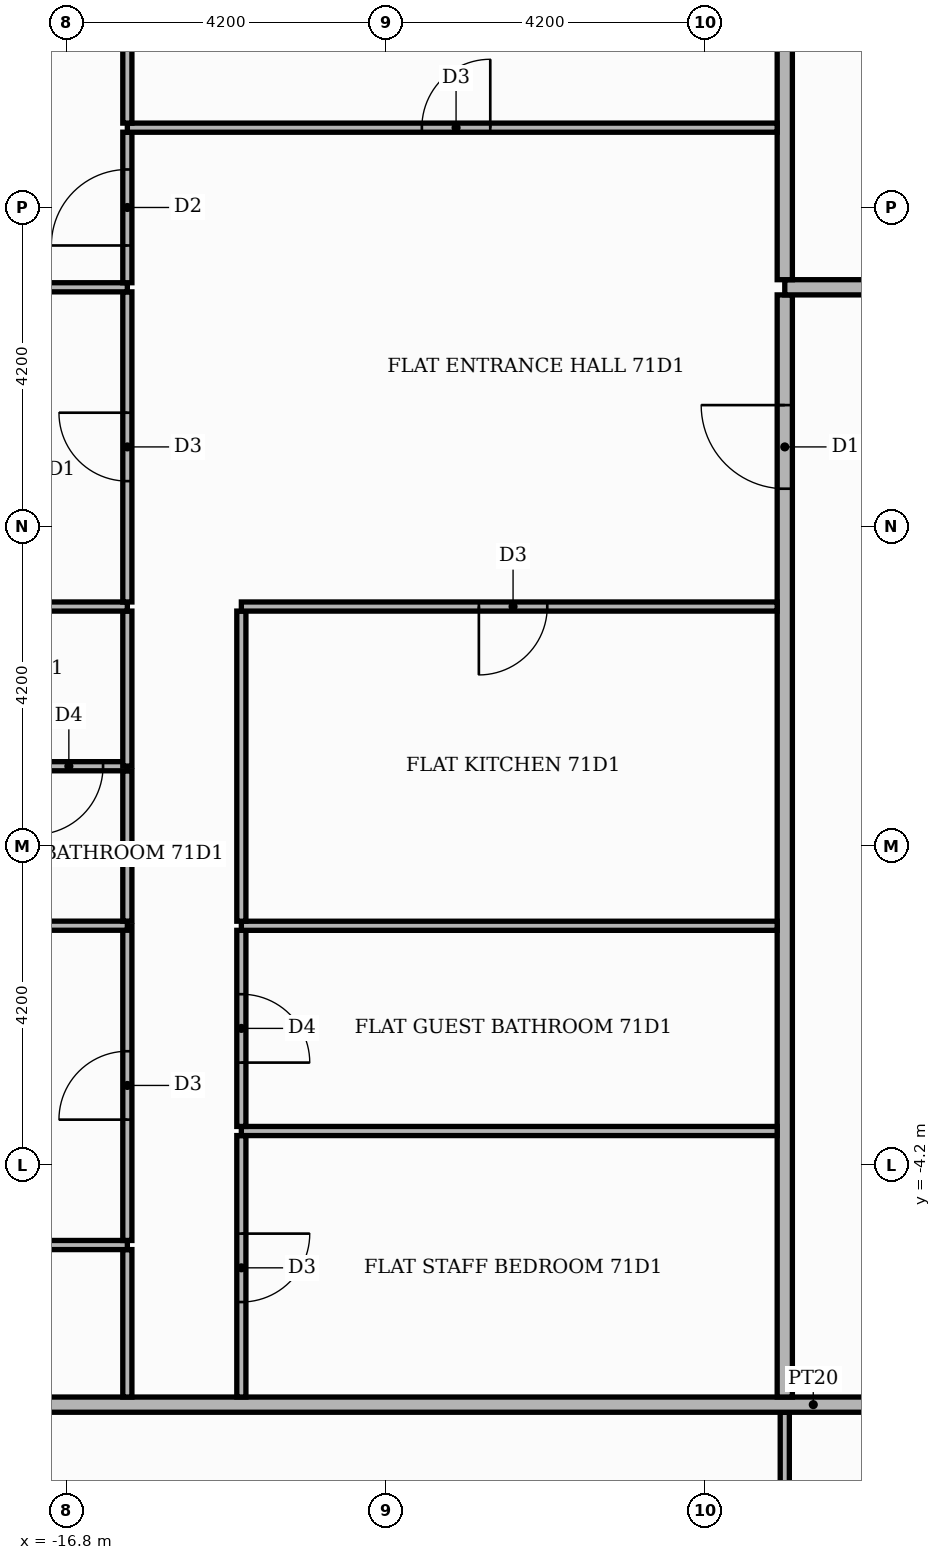
"""IFC4 building model, lengths in metres.
Left out: names, types, materials, properties, quantities, classifications, styles, units other than length and angle.
Written with IfcOpenShell. Run it as: python <this file> out.ifc"""

import sys

from ifc_helpers import new_model, si_unit, direction, frame, frame_2d, origin, place, context, subcontext, project, spatial, rectangle, extrude, element, fill, save


model = new_model("IFC4")
c1 = context("Model", 3, precision=1e-05, world=origin(), true_north=direction((0.0, 1.0)))
c2 = subcontext(c1, "Body", "Model", "MODEL_VIEW")
j1 = project(units=[si_unit("LENGTHUNIT", "METRE"), si_unit("PLANEANGLEUNIT", "RADIAN")], contexts=[c1])
p1 = place(None, origin())
s1 = spatial("IfcSite", under=j1, at=p1, CompositionType="ELEMENT")
p2 = place(p1, origin())
s2 = spatial("IfcBuilding", under=s1, at=p2, CompositionType="ELEMENT")
p3 = place(p2, frame((0.0, 0.0, 296.7)))
s3 = spatial("IfcBuildingStorey", under=s2, at=p3, CompositionType="ELEMENT", Elevation=296.7)
p4 = place(p3, frame((-7.35, -16.24, 0.0), z_axis=(0.0, 0.0, 1.0), x_axis=(0.0, 1.0, 0.0)))
e1 = element("IfcWall", 1, at=p4, inside=s3, PredefinedType="PARTITIONING", context=c2, shape_type="SweptSolid", body=[
    extrude(rectangle(XDim=8.79, YDim=0.12, at=frame_2d((4.395, 0.0))), origin(), (0.0, 0.0, 1.0), 3.55),
])
p5 = place(p4, frame((3.965, 0.0, 0.0)))
e2 = element("IfcOpeningElement", 2, at=p5, cuts=e1, PredefinedType="OPENING", context=c2, shape_type="SweptSolid", body=[
    extrude(rectangle(XDim=0.9, YDim=2.1, at=frame_2d((0.45, 1.05))), frame((0.0, 0.07, 0.0), z_axis=(0.0, -1.0, 0.0), x_axis=(1.0, 0.0, 0.0)), (0.0, 0.0, 1.0), 0.14),
])
p6 = place(p3, frame((-21.3, -7.35, 0.0), z_axis=(0.0, 0.0, 1.0), x_axis=(1.0, 0.0, 0.0)))
e3 = element("IfcWall", 3, at=p6, inside=s3, PredefinedType="PARTITIONING", context=c2, shape_type="SweptSolid", body=[
    extrude(rectangle(XDim=28.65, YDim=0.2, at=frame_2d((14.325, 0.0))), origin(), (0.0, 0.0, 1.0), 3.55),
])
p7 = place(p6, frame((16.55, 0.0, 0.0)))
e4 = element("IfcOpeningElement", 4, at=p7, cuts=e3, PredefinedType="OPENING", context=c2, shape_type="SweptSolid", body=[
    extrude(rectangle(XDim=1.1, YDim=2.4, at=frame_2d((0.55, 1.2))), frame((0.0, 0.11, 0.0), z_axis=(0.0, -1.0, 0.0), x_axis=(1.0, 0.0, 0.0)), (0.0, 0.0, 1.0), 0.22),
])
p8 = place(p3, frame((-16.0, -7.25, 0.0), z_axis=(0.0, 0.0, 1.0), x_axis=(0.0, 1.0, 0.0)))
e5 = element("IfcWall", 5, at=p8, inside=s3, PredefinedType="PARTITIONING", context=c2, shape_type="SweptSolid", body=[
    extrude(rectangle(XDim=1.94, YDim=0.12, at=frame_2d((0.97, 0.0))), origin(), (0.0, 0.0, 1.0), 3.55),
])
p9 = place(p3, frame((-14.5, -7.25, 0.0), z_axis=(0.0, 0.0, 1.0), x_axis=(0.0, 1.0, 0.0)))
e6 = element("IfcWall", 6, at=p9, inside=s3, PredefinedType="PARTITIONING", context=c2, shape_type="SweptSolid", body=[
    extrude(rectangle(XDim=3.44, YDim=0.12, at=frame_2d((1.72, 0.0))), origin(), (0.0, 0.0, 1.0), 3.55),
])
p10 = place(p9, frame((1.25, 0.0, 0.0)))
e7 = element("IfcOpeningElement", 7, at=p10, cuts=e6, PredefinedType="OPENING", context=c2, shape_type="SweptSolid", body=[
    extrude(rectangle(XDim=0.9, YDim=2.1, at=frame_2d((0.45, 1.05))), frame((0.0, 0.07, 0.0), z_axis=(0.0, -1.0, 0.0), x_axis=(1.0, 0.0, 0.0)), (0.0, 0.0, 1.0), 0.14),
])
p11 = place(p3, frame((-7.35, -7.25, 0.0), z_axis=(0.0, 0.0, 1.0), x_axis=(0.0, 1.0, 0.0)))
e8 = element("IfcWall", 8, at=p11, inside=s3, PredefinedType="PARTITIONING", context=c2, shape_type="SweptSolid", body=[
    extrude(rectangle(XDim=14.5, YDim=0.2, at=frame_2d((7.25, 0.0))), origin(), (0.0, 0.0, 1.0), 3.55),
])
p12 = place(p11, frame((11.95, 0.0, 0.0)))
e9 = element("IfcOpeningElement", 9, at=p12, cuts=e8, PredefinedType="OPENING", context=c2, shape_type="SweptSolid", body=[
    extrude(rectangle(XDim=1.1, YDim=2.4, at=frame_2d((0.55, 1.2))), frame((0.0, 0.11, 0.0), z_axis=(0.0, -1.0, 0.0), x_axis=(1.0, 0.0, 0.0)), (0.0, 0.0, 1.0), 0.22),
])
p13 = place(p3, frame((-21.3, -5.25, 0.0), z_axis=(0.0, 0.0, 1.0), x_axis=(1.0, 0.0, 0.0)))
e10 = element("IfcWall", 10, at=p13, inside=s3, PredefinedType="PARTITIONING", context=c2, shape_type="SweptSolid", body=[
    extrude(rectangle(XDim=5.3, YDim=0.12, at=frame_2d((2.65, 0.0))), origin(), (0.0, 0.0, 1.0), 3.55),
])
p14 = place(p13, frame((2.05, 0.0, 0.0)))
e11 = element("IfcOpeningElement", 11, at=p14, cuts=e10, PredefinedType="OPENING", context=c2, shape_type="SweptSolid", body=[
    extrude(rectangle(XDim=0.9, YDim=2.1, at=frame_2d((0.45, 1.05))), frame((0.0, 0.07, 0.0), z_axis=(0.0, -1.0, 0.0), x_axis=(1.0, 0.0, 0.0)), (0.0, 0.0, 1.0), 0.14),
])
p15 = place(p3, frame((-16.0, -5.19, 0.0), z_axis=(0.0, 0.0, 1.0), x_axis=(0.0, 1.0, 0.0)))
e12 = element("IfcWall", 12, at=p15, inside=s3, PredefinedType="PARTITIONING", context=c2, shape_type="SweptSolid", body=[
    extrude(rectangle(XDim=4.139, YDim=0.12, at=frame_2d((2.069, 0.0))), origin(), (0.0, 0.0, 1.0), 3.55),
])
p16 = place(p15, frame((1.59, 0.0, 0.0)))
e13 = element("IfcOpeningElement", 13, at=p16, cuts=e12, PredefinedType="OPENING", context=c2, shape_type="SweptSolid", body=[
    extrude(rectangle(XDim=0.9, YDim=2.1, at=frame_2d((0.45, 1.05))), frame((0.0, 0.07, 0.0), z_axis=(0.0, -1.0, 0.0), x_axis=(1.0, 0.0, 0.0)), (0.0, 0.0, 1.0), 0.14),
])
p17 = place(p3, frame((-14.5, -3.75, 0.0), z_axis=(0.0, 0.0, 1.0), x_axis=(1.0, 0.0, 0.0)))
e14 = element("IfcWall", 14, at=p17, inside=s3, PredefinedType="PARTITIONING", context=c2, shape_type="SweptSolid", body=[
    extrude(rectangle(XDim=7.05, YDim=0.12, at=frame_2d((3.525, 0.0))), origin(), (0.0, 0.0, 1.0), 3.55),
])
p18 = place(p3, frame((-14.5, -3.69, 0.0), z_axis=(0.0, 0.0, 1.0), x_axis=(0.0, 1.0, 0.0)))
e15 = element("IfcWall", 15, at=p18, inside=s3, PredefinedType="PARTITIONING", context=c2, shape_type="SweptSolid", body=[
    extrude(rectangle(XDim=2.58, YDim=0.12, at=frame_2d((1.29, 0.0))), origin(), (0.0, 0.0, 1.0), 3.55),
])
p19 = place(p18, frame((0.84, 0.0, 0.0)))
e16 = element("IfcOpeningElement", 16, at=p19, cuts=e15, PredefinedType="OPENING", context=c2, shape_type="SweptSolid", body=[
    extrude(rectangle(XDim=0.9, YDim=2.1, at=frame_2d((0.45, 1.05))), frame((0.0, 0.07, 0.0), z_axis=(0.0, -1.0, 0.0), x_axis=(1.0, 0.0, 0.0)), (0.0, 0.0, 1.0), 0.14),
])
p20 = place(p3, frame((-14.5, -1.05, 0.0), z_axis=(0.0, 0.0, 1.0), x_axis=(1.0, 0.0, 0.0)))
e17 = element("IfcWall", 17, at=p20, inside=s3, PredefinedType="PARTITIONING", context=c2, shape_type="SweptSolid", body=[
    extrude(rectangle(XDim=7.05, YDim=0.12, at=frame_2d((3.525, 0.0))), origin(), (0.0, 0.0, 1.0), 3.55),
])
p21 = place(p3, frame((-18.199, -1.049, 0.0), z_axis=(0.0, 0.0, 1.0), x_axis=(1.0, 0.0, 0.0)))
e18 = element("IfcWall", 18, at=p21, inside=s3, PredefinedType="PARTITIONING", context=c2, shape_type="SweptSolid", body=[
    extrude(rectangle(XDim=2.199, YDim=0.12, at=frame_2d((1.1, 0.0))), origin(), (0.0, 0.0, 1.0), 3.55),
])
p22 = place(p3, frame((-14.5, -0.99, 0.0), z_axis=(0.0, 0.0, 1.0), x_axis=(0.0, 1.0, 0.0)))
e19 = element("IfcWall", 19, at=p22, inside=s3, PredefinedType="PARTITIONING", context=c2, shape_type="SweptSolid", body=[
    extrude(rectangle(XDim=4.08, YDim=0.12, at=frame_2d((2.04, 0.0))), origin(), (0.0, 0.0, 1.0), 3.55),
])
p23 = place(p3, frame((-16.0, -0.989, 0.0), z_axis=(0.0, 0.0, 1.0), x_axis=(0.0, 1.0, 0.0)))
e20 = element("IfcWall", 20, at=p23, inside=s3, PredefinedType="PARTITIONING", context=c2, shape_type="SweptSolid", body=[
    extrude(rectangle(XDim=1.978, YDim=0.12, at=frame_2d((0.989, 0.0))), origin(), (0.0, 0.0, 1.0), 3.55),
])
p24 = place(p3, frame((-18.199, 1.049, 0.0), z_axis=(0.0, 0.0, 1.0), x_axis=(1.0, 0.0, 0.0)))
e21 = element("IfcWall", 21, at=p24, inside=s3, PredefinedType="PARTITIONING", context=c2, shape_type="SweptSolid", body=[
    extrude(rectangle(XDim=2.199, YDim=0.12, at=frame_2d((1.1, 0.0))), origin(), (0.0, 0.0, 1.0), 3.55),
])
p25 = place(p24, frame((0.979, 0.0, 0.0)))
e22 = element("IfcOpeningElement", 22, at=p25, cuts=e21, PredefinedType="OPENING", context=c2, shape_type="SweptSolid", body=[
    extrude(rectangle(XDim=0.9, YDim=2.1, at=frame_2d((0.45, 1.05))), frame((0.0, 0.07, 0.0), z_axis=(0.0, -1.0, 0.0), x_axis=(1.0, 0.0, 0.0)), (0.0, 0.0, 1.0), 0.14),
])
p26 = place(p3, frame((-16.0, 1.051, 0.0), z_axis=(0.0, 0.0, 1.0), x_axis=(0.0, 1.0, 0.0)))
e23 = element("IfcWall", 23, at=p26, inside=s3, PredefinedType="PARTITIONING", context=c2, shape_type="SweptSolid", body=[
    extrude(rectangle(XDim=2.039, YDim=0.12, at=frame_2d((1.02, 0.0))), origin(), (0.0, 0.0, 1.0), 3.55),
])
p27 = place(p3, frame((-21.3, 3.15, 0.0), z_axis=(0.0, 0.0, 1.0), x_axis=(1.0, 0.0, 0.0)))
e24 = element("IfcWall", 24, at=p27, inside=s3, PredefinedType="PARTITIONING", context=c2, shape_type="SweptSolid", body=[
    extrude(rectangle(XDim=5.3, YDim=0.12, at=frame_2d((2.65, 0.0))), origin(), (0.0, 0.0, 1.0), 3.55),
])
p28 = place(p27, frame((2.05, 0.0, 0.0)))
e25 = element("IfcOpeningElement", 25, at=p28, cuts=e24, PredefinedType="OPENING", context=c2, shape_type="SweptSolid", body=[
    extrude(rectangle(XDim=0.9, YDim=2.1, at=frame_2d((0.45, 1.05))), frame((0.0, 0.07, 0.0), z_axis=(0.0, -1.0, 0.0), x_axis=(1.0, 0.0, 0.0)), (0.0, 0.0, 1.0), 0.14),
])
p29 = place(p3, frame((-14.5, 3.15, 0.0), z_axis=(0.0, 0.0, 1.0), x_axis=(1.0, 0.0, 0.0)))
e26 = element("IfcWall", 26, at=p29, inside=s3, PredefinedType="PARTITIONING", context=c2, shape_type="SweptSolid", body=[
    extrude(rectangle(XDim=7.05, YDim=0.12, at=frame_2d((3.525, 0.0))), origin(), (0.0, 0.0, 1.0), 3.55),
])
p30 = place(p29, frame((3.125, 0.0, 0.0)))
e27 = element("IfcOpeningElement", 27, at=p30, cuts=e26, PredefinedType="OPENING", context=c2, shape_type="SweptSolid", body=[
    extrude(rectangle(XDim=0.9, YDim=2.1, at=frame_2d((0.45, 1.05))), frame((0.0, 0.07, 0.0), z_axis=(0.0, -1.0, 0.0), x_axis=(1.0, 0.0, 0.0)), (0.0, 0.0, 1.0), 0.14),
])
p31 = place(p3, frame((-16.0, 3.21, 0.0), z_axis=(0.0, 0.0, 1.0), x_axis=(0.0, 1.0, 0.0)))
e28 = element("IfcWall", 28, at=p31, inside=s3, PredefinedType="PARTITIONING", context=c2, shape_type="SweptSolid", body=[
    extrude(rectangle(XDim=4.08, YDim=0.12, at=frame_2d((2.04, 0.0))), origin(), (0.0, 0.0, 1.0), 3.55),
])
p32 = place(p31, frame((1.59, 0.0, 0.0)))
e29 = element("IfcOpeningElement", 29, at=p32, cuts=e28, PredefinedType="OPENING", context=c2, shape_type="SweptSolid", body=[
    extrude(rectangle(XDim=0.9, YDim=2.1, at=frame_2d((0.45, 1.05))), frame((0.0, 0.07, 0.0), z_axis=(0.0, -1.0, 0.0), x_axis=(1.0, 0.0, 0.0)), (0.0, 0.0, 1.0), 0.14),
])
p33 = place(p3, frame((-21.3, 7.35, 0.0), z_axis=(0.0, 0.0, 1.0), x_axis=(1.0, 0.0, 0.0)))
e30 = element("IfcWall", 30, at=p33, inside=s3, PredefinedType="PARTITIONING", context=c2, shape_type="SweptSolid", body=[
    extrude(rectangle(XDim=5.3, YDim=0.12, at=frame_2d((2.65, 0.0))), origin(), (0.0, 0.0, 1.0), 3.55),
])
p34 = place(p3, frame((-7.35, 7.35, 0.0), z_axis=(0.0, 0.0, 1.0), x_axis=(1.0, 0.0, 0.0)))
e31 = element("IfcWall", 31, at=p34, inside=s3, PredefinedType="PARTITIONING", context=c2, shape_type="SweptSolid", body=[
    extrude(rectangle(XDim=1.85, YDim=0.2, at=frame_2d((0.925, 0.0))), origin(), (0.0, 0.0, 1.0), 3.55),
])
p35 = place(p3, frame((-16.0, 7.41, 0.0), z_axis=(0.0, 0.0, 1.0), x_axis=(0.0, 1.0, 0.0)))
e32 = element("IfcWall", 32, at=p35, inside=s3, PredefinedType="PARTITIONING", context=c2, shape_type="SweptSolid", body=[
    extrude(rectangle(XDim=1.98, YDim=0.12, at=frame_2d((0.99, 0.0))), origin(), (0.0, 0.0, 1.0), 3.55),
])
p36 = place(p35, frame((0.49, 0.0, 0.0)))
e33 = element("IfcOpeningElement", 33, at=p36, cuts=e32, PredefinedType="OPENING", context=c2, shape_type="SweptSolid", body=[
    extrude(rectangle(XDim=1.0, YDim=2.1, at=frame_2d((0.5, 1.05))), frame((0.0, 0.07, 0.0), z_axis=(0.0, -1.0, 0.0), x_axis=(1.0, 0.0, 0.0)), (0.0, 0.0, 1.0), 0.14),
])
p37 = place(p3, frame((-7.35, 7.45, 0.0), z_axis=(0.0, 0.0, 1.0), x_axis=(0.0, 1.0, 0.0)))
e34 = element("IfcWall", 34, at=p37, inside=s3, PredefinedType="PARTITIONING", context=c2, shape_type="SweptSolid", body=[
    extrude(rectangle(XDim=13.85, YDim=0.2, at=frame_2d((6.925, 0.0))), origin(), (0.0, 0.0, 1.0), 3.55),
])
p38 = place(p3, frame((-16.0, 9.45, 0.0), z_axis=(0.0, 0.0, 1.0), x_axis=(1.0, 0.0, 0.0)))
e35 = element("IfcWall", 35, at=p38, inside=s3, PredefinedType="PARTITIONING", context=c2, shape_type="SweptSolid", body=[
    extrude(rectangle(XDim=8.55, YDim=0.12, at=frame_2d((4.275, 0.0))), origin(), (0.0, 0.0, 1.0), 3.55),
])
p39 = place(p38, frame((3.875, 0.0, 0.0)))
e36 = element("IfcOpeningElement", 36, at=p39, cuts=e35, PredefinedType="OPENING", context=c2, shape_type="SweptSolid", body=[
    extrude(rectangle(XDim=0.9, YDim=2.1, at=frame_2d((0.45, 1.05))), frame((0.0, 0.07, 0.0), z_axis=(0.0, -1.0, 0.0), x_axis=(1.0, 0.0, 0.0)), (0.0, 0.0, 1.0), 0.14),
])
p40 = place(p3, frame((-16.0, 9.51, 0.0), z_axis=(0.0, 0.0, 1.0), x_axis=(0.0, 1.0, 0.0)))
e37 = element("IfcWall", 37, at=p40, inside=s3, PredefinedType="PARTITIONING", context=c2, shape_type="SweptSolid", body=[
    extrude(rectangle(XDim=5.39, YDim=0.12, at=frame_2d((2.695, 0.0))), origin(), (0.0, 0.0, 1.0), 3.55),
])
p41 = place(p12, origin())
e38 = element("IfcDoor", 38, at=p41, inside=s3, OperationType="SINGLE_SWING_RIGHT", PredefinedType="DOOR", context=c2, shape_type="SweptSolid", body=[
    extrude(rectangle(XDim=1.1, YDim=2.4, at=frame_2d((0.55, 1.2))), frame((0.0, 0.025, 0.0), z_axis=(0.0, -1.0, 0.0), x_axis=(1.0, 0.0, 0.0)), (0.0, 0.0, 1.0), 0.05),
])
fill(e9, e38)
p42 = place(p39, origin())
e39 = element("IfcDoor", 39, at=p42, inside=s3, OperationType="SINGLE_SWING_RIGHT", PredefinedType="DOOR", context=c2, shape_type="SweptSolid", body=[
    extrude(rectangle(XDim=0.9, YDim=2.1, at=frame_2d((0.45, 1.05))), frame((0.0, 0.025, 0.0), z_axis=(0.0, -1.0, 0.0), x_axis=(1.0, 0.0, 0.0)), (0.0, 0.0, 1.0), 0.05),
])
fill(e36, e39)
p43 = place(p30, frame((0.9, 0.0, 0.0), z_axis=(0.0, 0.0, 1.0), x_axis=(-1.0, 0.0, 0.0)))
e40 = element("IfcDoor", 40, at=p43, inside=s3, OperationType="SINGLE_SWING_LEFT", PredefinedType="DOOR", context=c2, shape_type="SweptSolid", body=[
    extrude(rectangle(XDim=0.9, YDim=2.1, at=frame_2d((0.45, 1.05))), frame((0.0, 0.025, 0.0), z_axis=(0.0, -1.0, 0.0), x_axis=(1.0, 0.0, 0.0)), (0.0, 0.0, 1.0), 0.05),
])
fill(e27, e40)
p44 = place(p19, frame((0.9, 0.0, 0.0), z_axis=(0.0, 0.0, 1.0), x_axis=(-1.0, 0.0, 0.0)))
e41 = element("IfcDoor", 41, at=p44, inside=s3, OperationType="SINGLE_SWING_LEFT", PredefinedType="DOOR", context=c2, shape_type="SweptSolid", body=[
    extrude(rectangle(XDim=0.9, YDim=2.1, at=frame_2d((0.45, 1.05))), frame((0.0, 0.025, 0.0), z_axis=(0.0, -1.0, 0.0), x_axis=(1.0, 0.0, 0.0)), (0.0, 0.0, 1.0), 0.05),
])
fill(e16, e41)
p45 = place(p10, frame((0.9, 0.0, 0.0), z_axis=(0.0, 0.0, 1.0), x_axis=(-1.0, 0.0, 0.0)))
e42 = element("IfcDoor", 42, at=p45, inside=s3, OperationType="SINGLE_SWING_RIGHT", PredefinedType="DOOR", context=c2, shape_type="SweptSolid", body=[
    extrude(rectangle(XDim=0.9, YDim=2.1, at=frame_2d((0.45, 1.05))), frame((0.0, 0.025, 0.0), z_axis=(0.0, -1.0, 0.0), x_axis=(1.0, 0.0, 0.0)), (0.0, 0.0, 1.0), 0.05),
])
fill(e7, e42)
p46 = place(p36, origin())
e43 = element("IfcDoor", 43, at=p46, inside=s3, OperationType="SINGLE_SWING_LEFT", PredefinedType="DOOR", context=c2, shape_type="SweptSolid", body=[
    extrude(rectangle(XDim=1.0, YDim=2.1, at=frame_2d((0.5, 1.05))), frame((0.0, 0.025, 0.0), z_axis=(0.0, -1.0, 0.0), x_axis=(1.0, 0.0, 0.0)), (0.0, 0.0, 1.0), 0.05),
])
fill(e33, e43)
p47 = place(p32, origin())
e44 = element("IfcDoor", 44, at=p47, inside=s3, OperationType="SINGLE_SWING_RIGHT", PredefinedType="DOOR", context=c2, shape_type="SweptSolid", body=[
    extrude(rectangle(XDim=0.9, YDim=2.1, at=frame_2d((0.45, 1.05))), frame((0.0, 0.025, 0.0), z_axis=(0.0, -1.0, 0.0), x_axis=(1.0, 0.0, 0.0)), (0.0, 0.0, 1.0), 0.05),
])
fill(e29, e44)
p48 = place(p25, frame((0.9, 0.0, 0.0), z_axis=(0.0, 0.0, 1.0), x_axis=(-1.0, 0.0, 0.0)))
e45 = element("IfcDoor", 45, at=p48, inside=s3, OperationType="SINGLE_SWING_LEFT", PredefinedType="DOOR", context=c2, shape_type="SweptSolid", body=[
    extrude(rectangle(XDim=0.9, YDim=2.1, at=frame_2d((0.45, 1.05))), frame((0.0, 0.025, 0.0), z_axis=(0.0, -1.0, 0.0), x_axis=(1.0, 0.0, 0.0)), (0.0, 0.0, 1.0), 0.05),
])
fill(e22, e45)
p49 = place(p16, origin())
e46 = element("IfcDoor", 46, at=p49, inside=s3, OperationType="SINGLE_SWING_LEFT", PredefinedType="DOOR", context=c2, shape_type="SweptSolid", body=[
    extrude(rectangle(XDim=0.9, YDim=2.1, at=frame_2d((0.45, 1.05))), frame((0.0, 0.025, 0.0), z_axis=(0.0, -1.0, 0.0), x_axis=(1.0, 0.0, 0.0)), (0.0, 0.0, 1.0), 0.05),
])
fill(e13, e46)
save(model, sys.argv[1])
